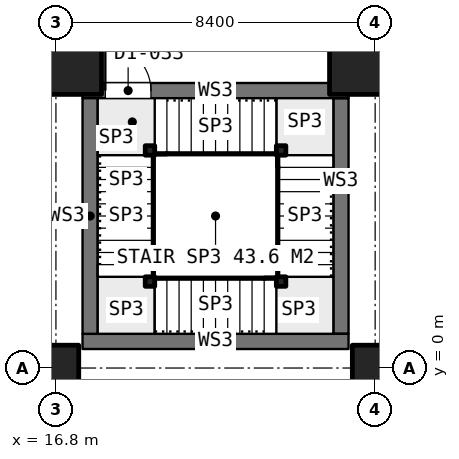
"""IFC4 building model, lengths in metres.
Left out: names, types, materials, properties, quantities, classifications, styles, units other than length and angle.
Written with IfcOpenShell. Run it as: python <this file> out.ifc"""

import sys

from ifc_helpers import new_model, si_unit, direction, frame, frame_2d, origin, origin_2d, place, context, subcontext, project, spatial, rectangle, extrude, element, fill, save


model = new_model("IFC4")
c1 = context("Model", 3, precision=1e-05, world=origin(), true_north=direction((0.0, 1.0)))
c2 = subcontext(c1, "Body", "Model", "MODEL_VIEW")
j1 = project(units=[si_unit("LENGTHUNIT", "METRE"), si_unit("PLANEANGLEUNIT", "RADIAN")], contexts=[c1])
p1 = place(None, origin())
s1 = spatial("IfcSite", under=j1, at=p1, CompositionType="ELEMENT")
p2 = place(p1, origin())
s2 = spatial("IfcBuilding", under=s1, at=p2, CompositionType="ELEMENT")
p3 = place(p2, frame((0.0, 0.0, 10.4)))
s3 = spatial("IfcBuildingStorey", under=s2, at=p3, CompositionType="ELEMENT", Elevation=10.4)
p4 = place(p3, frame((16.8, 0.0, 0.0), z_axis=(0.0, 0.0, 1.0), x_axis=(1.0, 0.0, 0.0)))
e1 = element("IfcColumn", 1, at=p4, inside=s3, PredefinedType="COLUMN", context=c2, shape_type="SweptSolid", body=[
    extrude(rectangle(XDim=1.2, YDim=1.2, at=origin_2d()), origin(), (0.0, 0.0, 1.0), 5.0),
])
p5 = place(p3, frame((16.8, 8.4, 0.0), z_axis=(0.0, 0.0, 1.0), x_axis=(1.0, 0.0, 0.0)))
e2 = element("IfcColumn", 2, at=p5, inside=s3, PredefinedType="COLUMN", context=c2, shape_type="SweptSolid", body=[
    extrude(rectangle(XDim=2.4, YDim=2.4, at=origin_2d()), origin(), (0.0, 0.0, 1.0), 5.0),
])
p6 = place(p3, frame((25.2, 0.0, 0.0), z_axis=(0.0, 0.0, 1.0), x_axis=(1.0, 0.0, 0.0)))
e3 = element("IfcColumn", 3, at=p6, inside=s3, PredefinedType="COLUMN", context=c2, shape_type="SweptSolid", body=[
    extrude(rectangle(XDim=1.2, YDim=1.2, at=origin_2d()), origin(), (0.0, 0.0, 1.0), 5.0),
])
p7 = place(p3, frame((25.2, 8.4, 0.0), z_axis=(0.0, 0.0, 1.0), x_axis=(1.0, 0.0, 0.0)))
e4 = element("IfcColumn", 4, at=p7, inside=s3, PredefinedType="COLUMN", context=c2, shape_type="SweptSolid", body=[
    extrude(rectangle(XDim=2.4, YDim=2.4, at=origin_2d()), origin(), (0.0, 0.0, 1.0), 5.0),
])
p8 = place(p3, frame((17.5, 0.7, 0.0), z_axis=(0.0, 0.0, 1.0), x_axis=(1.0, 0.0, 0.0)))
e5 = element("IfcWall", 5, at=p8, inside=s3, PredefinedType="SOLIDWALL", context=c2, shape_type="SweptSolid", body=[
    extrude(rectangle(XDim=7.0, YDim=0.4, at=frame_2d((3.5, 0.0))), origin(), (0.0, 0.0, 1.0), 4.7),
])
p9 = place(p3, frame((17.5, 7.3, 0.0), z_axis=(0.0, 0.0, 1.0), x_axis=(1.0, 0.0, 0.0)))
e6 = element("IfcWall", 6, at=p9, inside=s3, PredefinedType="SOLIDWALL", context=c2, shape_type="SweptSolid", body=[
    extrude(rectangle(XDim=7.0, YDim=0.4, at=frame_2d((3.5, 0.0))), origin(), (0.0, 0.0, 1.0), 4.7),
])
p10 = place(p9, frame((0.6, 0.0, 0.0)))
e7 = element("IfcOpeningElement", 7, at=p10, cuts=e6, PredefinedType="OPENING", context=c2, shape_type="SweptSolid", body=[
    extrude(rectangle(XDim=1.2, YDim=2.1, at=frame_2d((0.6, 1.05))), frame((0.0, 0.21, 0.0), z_axis=(0.0, -1.0, 0.0), x_axis=(1.0, 0.0, 0.0)), (0.0, 0.0, 1.0), 0.42),
])
for number, where, z_axis, x_axis in (
    (8, (17.7, 0.9, 0.0), (0.0, 0.0, 1.0), (0.0, 1.0, 0.0)),
    (9, (24.3, 0.9, 0.0), (0.0, 0.0, 1.0), (0.0, 1.0, 0.0)),
):
    element("IfcWall", number, at=place(p3, frame(where, z_axis=z_axis, x_axis=x_axis)), inside=s3, PredefinedType="SOLIDWALL", context=c2, shape_type="SweptSolid", body=[
        extrude(rectangle(XDim=6.2, YDim=0.4, at=frame_2d((3.1, 0.0))), origin(), (0.0, 0.0, 1.0), 4.7),
    ])
for number, where, z_axis, x_axis in (
    (10, (19.275, 5.725, 0.0), (0.0, 0.0, 1.0), (1.0, 0.0, 0.0)),
    (11, (19.275, 2.275, 0.0), (0.0, 0.0, 1.0), (1.0, 0.0, 0.0)),
    (12, (22.725, 2.275, 0.0), (0.0, 0.0, 1.0), (1.0, 0.0, 0.0)),
    (13, (22.725, 5.725, 0.0), (0.0, 0.0, 1.0), (1.0, 0.0, 0.0)),
):
    element("IfcColumn", number, at=place(p3, frame(where, z_axis=z_axis, x_axis=x_axis)), inside=s3, PredefinedType="COLUMN", context=c2, shape_type="SweptSolid", body=[
        extrude(rectangle(XDim=0.25, YDim=0.25, at=origin_2d()), origin(), (0.0, 0.0, 1.0), 5.0),
    ])
p11 = place(p10, origin())
e14 = element("IfcDoor", 14, at=p11, inside=s3, OperationType="SINGLE_SWING_RIGHT", PredefinedType="DOOR", context=c2, shape_type="SweptSolid", body=[
    extrude(rectangle(XDim=1.2, YDim=2.1, at=frame_2d((0.6, 1.05))), frame((0.0, 0.025, 0.0), z_axis=(0.0, -1.0, 0.0), x_axis=(1.0, 0.0, 0.0)), (0.0, 0.0, 1.0), 0.05),
])
fill(e7, e14)
save(model, sys.argv[1])
